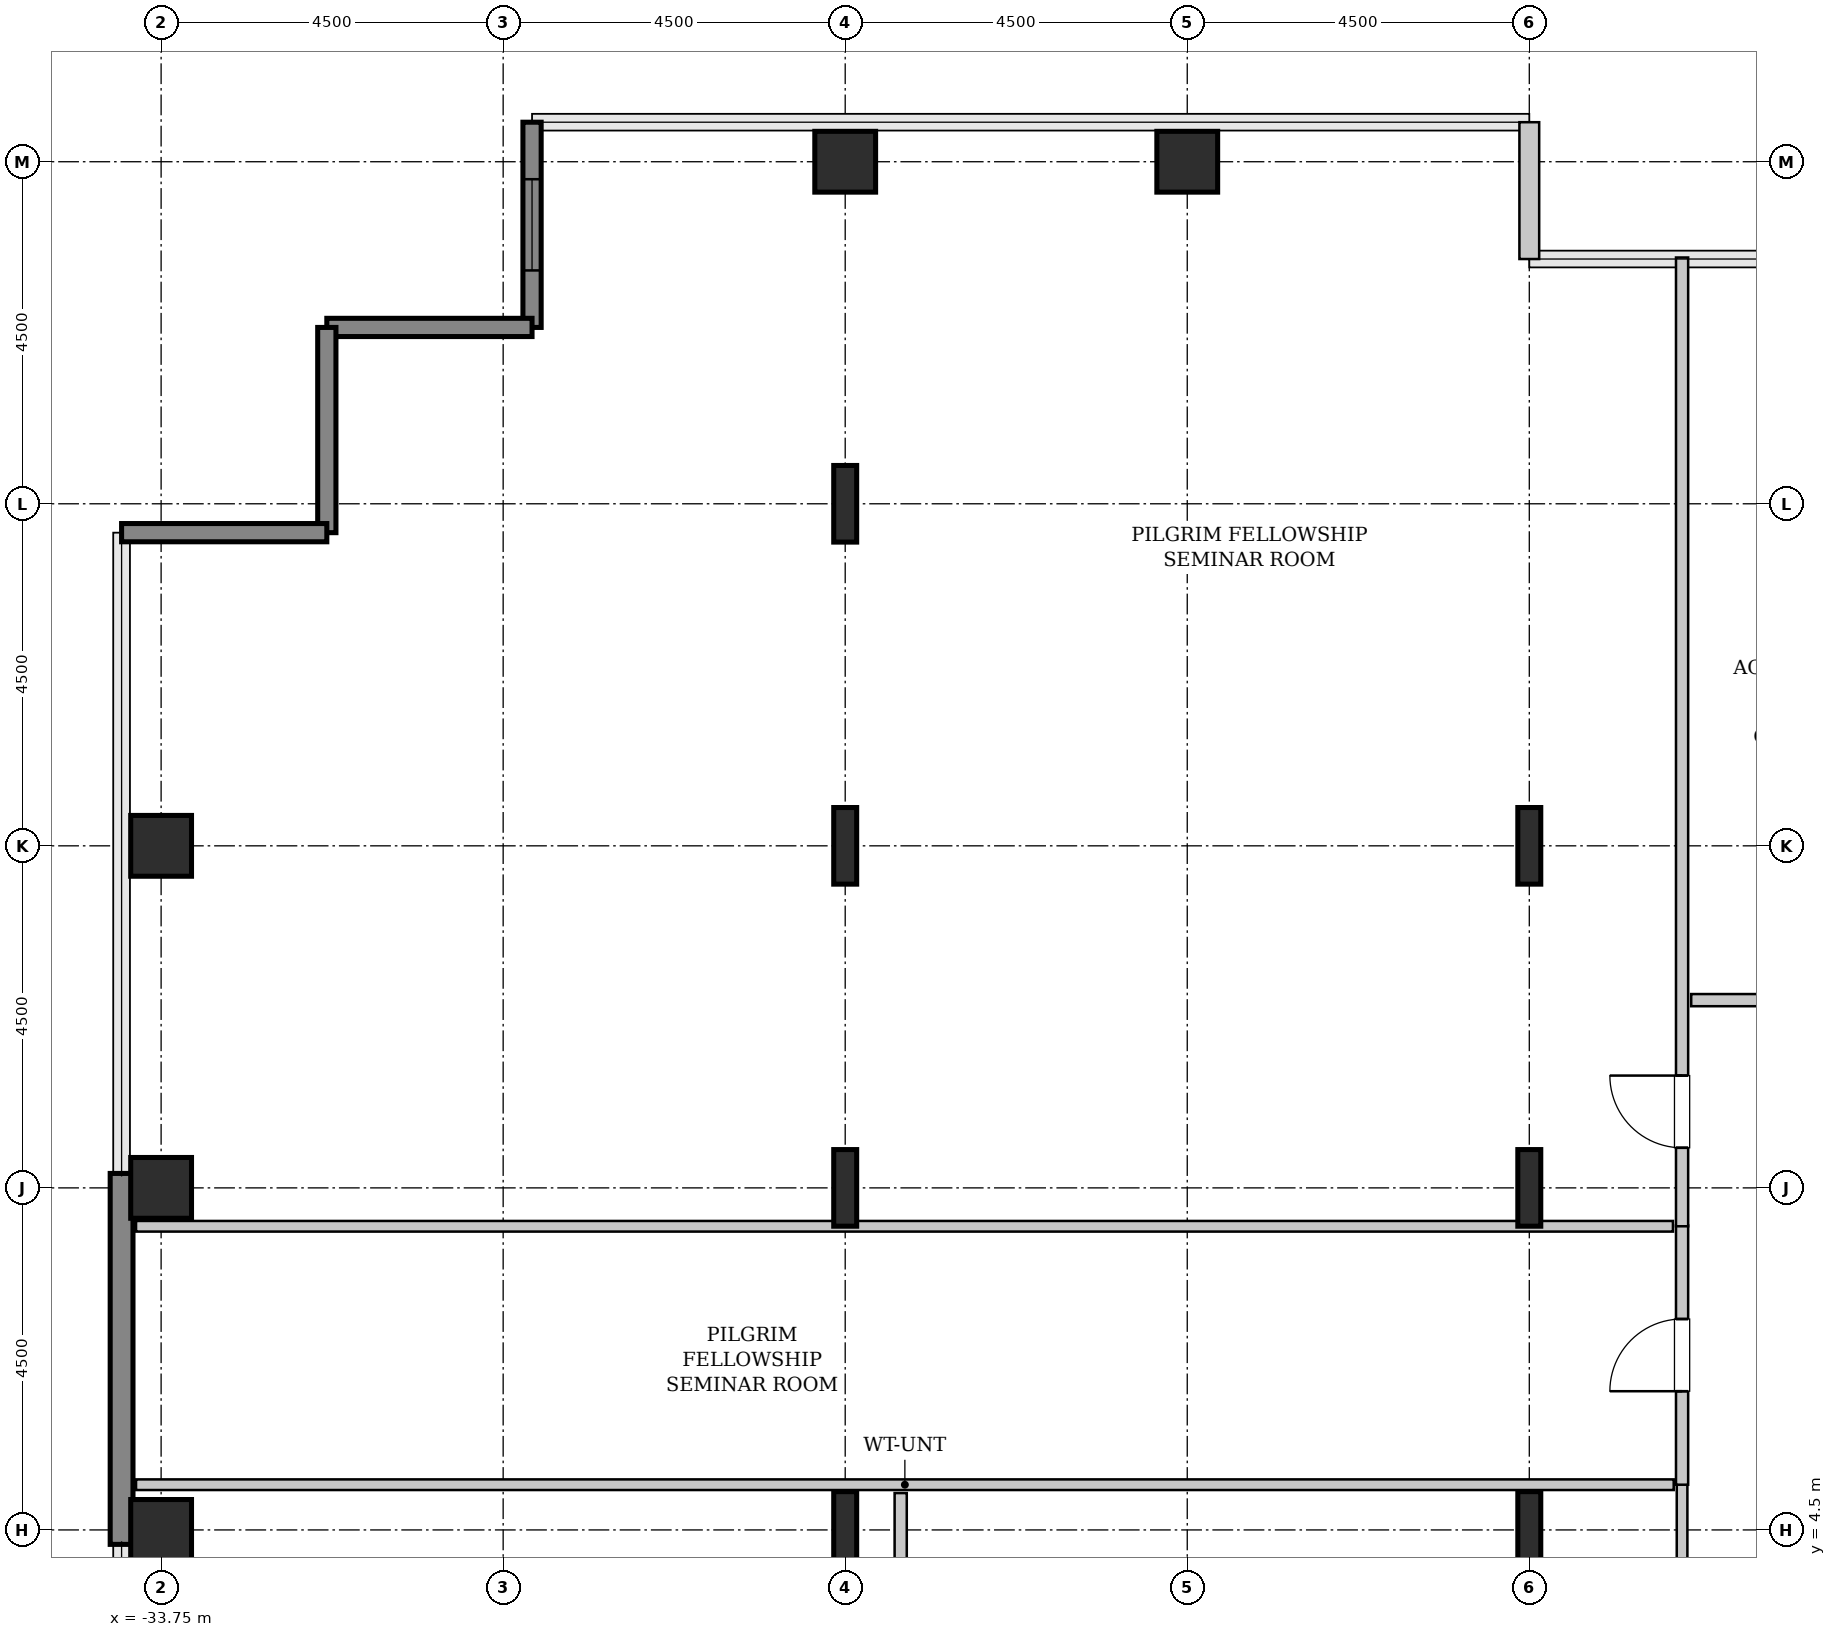
"""IFC4 building model, lengths in metres.
Left out: names, types, materials, properties, quantities, classifications, styles, units other than length and angle.
Written with IfcOpenShell. Run it as: python <this file> out.ifc"""

import sys

from ifc_helpers import new_model, si_unit, direction, frame, frame_2d, origin, origin_2d, place, context, subcontext, project, spatial, rectangle, hollow_rectangle, i_section, extrude, source, transform, mapped, element, fill, save


model = new_model("IFC4")
c1 = context("Model", 3, precision=1e-05, world=origin(), true_north=direction((0.0, 1.0)))
c2 = subcontext(c1, "Body", "Model", "MODEL_VIEW")
j1 = project(units=[si_unit("LENGTHUNIT", "METRE"), si_unit("PLANEANGLEUNIT", "RADIAN")], contexts=[c1])
p1 = place(None, origin())
s1 = spatial("IfcSite", under=j1, at=p1, CompositionType="ELEMENT")
p2 = place(p1, origin())
s2 = spatial("IfcBuilding", under=s1, at=p2, CompositionType="ELEMENT")
p3 = place(p2, frame((0.0, 0.0, 113.6)))
s3 = spatial("IfcBuildingStorey", under=s2, at=p3, CompositionType="ELEMENT", Elevation=113.6)
m1 = source(origin(), c2, "Body", "SweptSolid", [
    extrude(hollow_rectangle(XDim=0.8, YDim=0.8, WallThickness=0.04, InnerFilletRadius=0.04, OuterFilletRadius=0.08, at=origin_2d()), origin(), (0.0, 0.0, 1.0), 3.8),
])
for number, where, z_axis, x_axis in (
    (1, (-33.75, 4.5, 0.0), (0.0, 0.0, 1.0), (1.0, 0.0, 0.0)),
    (2, (-33.75, 9.0, 0.0), (0.0, 0.0, 1.0), (1.0, 0.0, 0.0)),
    (3, (-33.75, 13.5, 0.0), (0.0, 0.0, 1.0), (1.0, 0.0, 0.0)),
):
    element("IfcColumn", number, at=place(p3, frame(where, z_axis=z_axis, x_axis=x_axis)), inside=s3, PredefinedType="COLUMN", context=c2, shape_type="MappedRepresentation", body=[
        mapped(m1, transform((0.0, 0.0, 0.0), x_axis=(1.0, 0.0, 0.0), y_axis=(0.0, 1.0, 0.0), z_axis=(0.0, 0.0, 1.0), scale=1.0)),
    ])
m2 = source(origin(), c2, "Body", "SweptSolid", [
    extrude(i_section(OverallWidth=0.302, OverallDepth=1.008, WebThickness=0.021, FlangeThickness=0.04, FilletRadius=0.03, at=origin_2d()), origin(), (0.0, 0.0, 1.0), 3.8),
])
for number, where, z_axis, x_axis in (
    (4, (-24.75, 4.5, 0.0), (0.0, 0.0, 1.0), (1.0, 0.0, 0.0)),
    (5, (-24.75, 9.0, 0.0), (0.0, 0.0, 1.0), (1.0, 0.0, 0.0)),
    (6, (-24.75, 13.5, 0.0), (0.0, 0.0, 1.0), (1.0, 0.0, 0.0)),
    (7, (-24.75, 18.0, 0.0), (0.0, 0.0, 1.0), (1.0, 0.0, 0.0)),
):
    element("IfcColumn", number, at=place(p3, frame(where, z_axis=z_axis, x_axis=x_axis)), inside=s3, PredefinedType="COLUMN", context=c2, shape_type="MappedRepresentation", body=[
        mapped(m2, transform((0.0, 0.0, 0.0), x_axis=(1.0, 0.0, 0.0), y_axis=(0.0, 1.0, 0.0), z_axis=(0.0, 0.0, 1.0), scale=1.0)),
    ])
for number, where, z_axis, x_axis in (
    (8, (-24.75, 22.5, 0.0), (0.0, 0.0, 1.0), (1.0, 0.0, 0.0)),
    (9, (-20.25, 22.5, 0.0), (0.0, 0.0, 1.0), (1.0, 0.0, 0.0)),
):
    element("IfcColumn", number, at=place(p3, frame(where, z_axis=z_axis, x_axis=x_axis)), inside=s3, PredefinedType="COLUMN", context=c2, shape_type="MappedRepresentation", body=[
        mapped(m1, transform((0.0, 0.0, 0.0), x_axis=(1.0, 0.0, 0.0), y_axis=(0.0, 1.0, 0.0), z_axis=(0.0, 0.0, 1.0), scale=1.0)),
    ])
for number, where, z_axis, x_axis in (
    (10, (-15.75, 4.5, 0.0), (0.0, 0.0, 1.0), (1.0, 0.0, 0.0)),
    (11, (-15.75, 9.0, 0.0), (0.0, 0.0, 1.0), (1.0, 0.0, 0.0)),
    (12, (-15.75, 13.5, 0.0), (0.0, 0.0, 1.0), (1.0, 0.0, 0.0)),
):
    element("IfcColumn", number, at=place(p3, frame(where, z_axis=z_axis, x_axis=x_axis)), inside=s3, PredefinedType="COLUMN", context=c2, shape_type="MappedRepresentation", body=[
        mapped(m2, transform((0.0, 0.0, 0.0), x_axis=(1.0, 0.0, 0.0), y_axis=(0.0, 1.0, 0.0), z_axis=(0.0, 0.0, 1.0), scale=1.0)),
    ])
m3 = source(origin(), c2, "Body", "SweptSolid", [
    extrude(rectangle(XDim=4.88, YDim=0.3, at=frame_2d((2.44, 0.0))), origin(), (0.0, 0.0, 1.0), 3.55),
])
p4 = place(p3, frame((-34.27, 4.31, 0.0), z_axis=(0.0, 0.0, 1.0), x_axis=(0.0, 1.0, 0.0)))
e13 = element("IfcWall", 13, at=p4, inside=s3, PredefinedType="SHEAR", context=c2, shape_type="MappedRepresentation", body=[
    mapped(m3, transform((0.0, 0.0, 0.0), x_axis=(1.0, 0.0, 0.0), y_axis=(0.0, 1.0, 0.0), z_axis=(0.0, 0.0, 1.0), scale=1.0)),
])
m4 = source(origin(), c2, "Body", "SweptSolid", [
    extrude(rectangle(XDim=1.8, YDim=0.26, at=frame_2d((0.9, 0.0))), origin(), (0.0, 0.0, 1.0), 3.55),
])
p5 = place(p3, frame((-15.75, 21.22, 0.0), z_axis=(0.0, 0.0, 1.0), x_axis=(0.0, 1.0, 0.0)))
e14 = element("IfcWall", 14, at=p5, inside=s3, PredefinedType="SOLIDWALL", context=c2, shape_type="MappedRepresentation", body=[
    mapped(m4, transform((0.0, 0.0, 0.0), x_axis=(1.0, 0.0, 0.0), y_axis=(0.0, 1.0, 0.0), z_axis=(0.0, 0.0, 1.0), scale=1.0)),
])
m5 = source(origin(), c2, "Body", "SweptSolid", [
    extrude(rectangle(XDim=2.7, YDim=0.24, at=frame_2d((1.35, 0.0))), origin(), (0.0, 0.0, 1.0), 3.55),
])
p6 = place(p3, frame((-28.87, 23.02, 0.0), z_axis=(0.0, 0.0, 1.0), x_axis=(0.0, -1.0, 0.0)))
e15 = element("IfcWall", 15, at=p6, inside=s3, PredefinedType="SHEAR", context=c2, shape_type="MappedRepresentation", body=[
    mapped(m5, transform((0.0, 0.0, 0.0), x_axis=(1.0, 0.0, 0.0), y_axis=(0.0, 1.0, 0.0), z_axis=(0.0, 0.0, 1.0), scale=1.0)),
])
p7 = place(p6, frame((0.75, 0.0, 0.85)))
e16 = element("IfcOpeningElement", 16, at=p7, cuts=e15, PredefinedType="OPENING", context=c2, shape_type="SweptSolid", body=[
    extrude(rectangle(XDim=1.2, YDim=1.8, at=frame_2d((0.6, 0.9))), frame((0.0, 0.13, 0.0), z_axis=(0.0, -1.0, 0.0), x_axis=(1.0, 0.0, 0.0)), (0.0, 0.0, 1.0), 0.26),
])
for number, where, z_axis, x_axis in (
    (17, (-28.87, 20.32, 0.0), (0.0, 0.0, 1.0), (-1.0, 0.0, 0.0)),
    (18, (-31.57, 20.32, 0.0), (0.0, 0.0, 1.0), (0.0, -1.0, 0.0)),
    (19, (-31.57, 17.62, 0.0), (0.0, 0.0, 1.0), (-1.0, 0.0, 0.0)),
):
    element("IfcWall", number, at=place(p3, frame(where, z_axis=z_axis, x_axis=x_axis)), inside=s3, PredefinedType="SHEAR", context=c2, shape_type="MappedRepresentation", body=[
        mapped(m5, transform((0.0, 0.0, 0.0), x_axis=(1.0, 0.0, 0.0), y_axis=(0.0, 1.0, 0.0), z_axis=(0.0, 0.0, 1.0), scale=1.0)),
    ])
m6 = source(origin(), c2, "Body", "SweptSolid", [
    extrude(rectangle(XDim=6.365, YDim=0.14, at=frame_2d((3.183, 0.0))), origin(), (0.0, 0.0, 1.0), 3.535),
])
p8 = place(p3, frame((-13.74, -1.26, 0.0), z_axis=(0.0, 0.0, 1.0), x_axis=(0.0, 1.0, 0.0)))
e20 = element("IfcWall", 20, at=p8, inside=s3, PredefinedType="PARTITIONING", context=c2, shape_type="MappedRepresentation", body=[
    mapped(m6, transform((0.0, 0.0, 0.0), x_axis=(1.0, 0.0, 0.0), y_axis=(0.0, 1.0, 0.0), z_axis=(0.0, 0.0, 1.0), scale=1.0)),
])
m7 = source(origin(), c2, "Body", "SweptSolid", [
    extrude(rectangle(XDim=20.23, YDim=0.14, at=frame_2d((10.115, 0.0))), origin(), (0.0, 0.0, 1.0), 3.535),
])
p9 = place(p3, frame((-34.08, 5.095, 0.0), z_axis=(0.0, 0.0, 1.0), x_axis=(1.0, 0.0, 0.0)))
e21 = element("IfcWall", 21, at=p9, inside=s3, PredefinedType="PARTITIONING", context=c2, shape_type="MappedRepresentation", body=[
    mapped(m7, transform((0.0, 0.0, 0.0), x_axis=(1.0, 0.0, 0.0), y_axis=(0.0, 1.0, 0.0), z_axis=(0.0, 0.0, 1.0), scale=1.0)),
])
m8 = source(origin(), c2, "Body", "SweptSolid", [
    extrude(rectangle(XDim=10.08, YDim=0.16, at=frame_2d((5.04, 0.0))), origin(), (0.0, 0.0, 1.0), 3.535),
])
p10 = place(p3, frame((-24.02, -5.095, 0.0), z_axis=(0.0, 0.0, 1.0), x_axis=(0.0, 1.0, 0.0)))
e22 = element("IfcWall", 22, at=p10, inside=s3, PredefinedType="PARTITIONING", context=c2, shape_type="MappedRepresentation", body=[
    mapped(m8, transform((0.0, 0.0, 0.0), x_axis=(1.0, 0.0, 0.0), y_axis=(0.0, 1.0, 0.0), z_axis=(0.0, 0.0, 1.0), scale=1.0)),
])
p11 = place(p10, frame((2.37, 0.0, 0.0)))
e23 = element("IfcOpeningElement", 23, at=p11, cuts=e22, PredefinedType="OPENING", context=c2, shape_type="SweptSolid", body=[
    extrude(rectangle(XDim=0.95, YDim=2.1, at=frame_2d((0.475, 1.05))), frame((0.0, 0.09, 0.0), z_axis=(0.0, -1.0, 0.0), x_axis=(1.0, 0.0, 0.0)), (0.0, 0.0, 1.0), 0.18),
])
m9 = source(origin(), c2, "Body", "SweptSolid", [
    extrude(rectangle(XDim=3.41, YDim=0.16, at=frame_2d((1.705, 0.0))), origin(), (0.0, 0.0, 1.0), 3.535),
])
p12 = place(p3, frame((-13.74, 5.095, 0.0), z_axis=(0.0, 0.0, 1.0), x_axis=(0.0, 1.0, 0.0)))
e24 = element("IfcWall", 24, at=p12, inside=s3, PredefinedType="PARTITIONING", context=c2, shape_type="MappedRepresentation", body=[
    mapped(m9, transform((0.0, 0.0, 0.0), x_axis=(1.0, 0.0, 0.0), y_axis=(0.0, 1.0, 0.0), z_axis=(0.0, 0.0, 1.0), scale=1.0)),
])
p13 = place(p12, frame((1.23, 0.0, 0.0)))
e25 = element("IfcOpeningElement", 25, at=p13, cuts=e24, PredefinedType="OPENING", context=c2, shape_type="SweptSolid", body=[
    extrude(rectangle(XDim=0.95, YDim=2.1, at=frame_2d((0.475, 1.05))), frame((0.0, 0.09, 0.0), z_axis=(0.0, -1.0, 0.0), x_axis=(1.0, 0.0, 0.0)), (0.0, 0.0, 1.0), 0.18),
])
m10 = source(origin(), c2, "Body", "SweptSolid", [
    extrude(rectangle(XDim=20.22, YDim=0.14, at=frame_2d((10.11, 0.0))), origin(), (0.0, 0.0, 1.0), 2.875),
])
p14 = place(p3, frame((-34.08, 8.495, 0.0), z_axis=(0.0, 0.0, 1.0), x_axis=(1.0, 0.0, 0.0)))
e26 = element("IfcWall", 26, at=p14, inside=s3, PredefinedType="PARTITIONING", context=c2, shape_type="MappedRepresentation", body=[
    mapped(m10, transform((0.0, 0.0, 0.0), x_axis=(1.0, 0.0, 0.0), y_axis=(0.0, 1.0, 0.0), z_axis=(0.0, 0.0, 1.0), scale=1.0)),
])
m11 = source(origin(), c2, "Body", "SweptSolid", [
    extrude(rectangle(XDim=12.745, YDim=0.16, at=frame_2d((6.373, 0.0))), origin(), (0.0, 0.0, 1.0), 3.535),
])
p15 = place(p3, frame((-13.74, 8.495, 0.0), z_axis=(0.0, 0.0, 1.0), x_axis=(0.0, 1.0, 0.0)))
e27 = element("IfcWall", 27, at=p15, inside=s3, PredefinedType="PARTITIONING", context=c2, shape_type="MappedRepresentation", body=[
    mapped(m11, transform((0.0, 0.0, 0.0), x_axis=(1.0, 0.0, 0.0), y_axis=(0.0, 1.0, 0.0), z_axis=(0.0, 0.0, 1.0), scale=1.0)),
])
p16 = place(p15, frame((1.032, 0.0, 0.0)))
e28 = element("IfcOpeningElement", 28, at=p16, cuts=e27, PredefinedType="OPENING", context=c2, shape_type="SweptSolid", body=[
    extrude(rectangle(XDim=0.95, YDim=2.1, at=frame_2d((0.475, 1.05))), frame((0.0, 0.09, 0.0), z_axis=(0.0, -1.0, 0.0), x_axis=(1.0, 0.0, 0.0)), (0.0, 0.0, 1.0), 0.18),
])
m12 = source(origin(), c2, "Body", "SweptSolid", [
    extrude(rectangle(XDim=4.125, YDim=0.16, at=frame_2d((2.062, 0.0))), origin(), (0.0, 0.0, 1.0), 3.535),
])
p17 = place(p3, frame((-13.62, 11.47, 0.0), z_axis=(0.0, 0.0, 1.0), x_axis=(1.0, 0.0, 0.0)))
e29 = element("IfcWall", 29, at=p17, inside=s3, PredefinedType="PARTITIONING", context=c2, shape_type="MappedRepresentation", body=[
    mapped(m12, transform((0.0, 0.0, 0.0), x_axis=(1.0, 0.0, 0.0), y_axis=(0.0, 1.0, 0.0), z_axis=(0.0, 0.0, 1.0), scale=1.0)),
])
p18 = place(p17, frame((1.587, 0.0, 0.0)))
e30 = element("IfcOpeningElement", 30, at=p18, cuts=e29, PredefinedType="OPENING", context=c2, shape_type="SweptSolid", body=[
    extrude(rectangle(XDim=0.95, YDim=2.1, at=frame_2d((0.475, 1.05))), frame((0.0, 0.09, 0.0), z_axis=(0.0, -1.0, 0.0), x_axis=(1.0, 0.0, 0.0)), (0.0, 0.0, 1.0), 0.18),
])
m13 = source(origin(), c2, "Body", "SweptSolid", [
    extrude(rectangle(XDim=1.2, YDim=1.8, at=frame_2d((0.6, 0.9))), frame((0.0, 0.03, 0.0), z_axis=(0.0, -1.0, 0.0), x_axis=(1.0, 0.0, 0.0)), (0.0, 0.0, 1.0), 0.06),
])
p19 = place(p7, origin())
e31 = element("IfcWindow", 31, at=p19, inside=s3, PartitioningType="SINGLE_PANEL", PredefinedType="WINDOW", context=c2, shape_type="MappedRepresentation", body=[
    mapped(m13, transform((0.0, 0.0, 0.0), x_axis=(1.0, 0.0, 0.0), y_axis=(0.0, 1.0, 0.0), z_axis=(0.0, 0.0, 1.0), scale=1.0)),
])
fill(e16, e31)
m14 = source(origin(), c2, "Body", "SweptSolid", [
    extrude(rectangle(XDim=0.95, YDim=2.1, at=frame_2d((0.475, 1.05))), frame((0.0, 0.025, 0.0), z_axis=(0.0, -1.0, 0.0), x_axis=(1.0, 0.0, 0.0)), (0.0, 0.0, 1.0), 0.05),
])
p20 = place(p13, origin())
e32 = element("IfcDoor", 32, at=p20, inside=s3, OperationType="SINGLE_SWING_LEFT", PredefinedType="DOOR", context=c2, shape_type="MappedRepresentation", body=[
    mapped(m14, transform((0.0, 0.0, 0.0), x_axis=(1.0, 0.0, 0.0), y_axis=(0.0, 1.0, 0.0), z_axis=(0.0, 0.0, 1.0), scale=1.0)),
])
fill(e25, e32)
p21 = place(p16, origin())
e33 = element("IfcDoor", 33, at=p21, inside=s3, OperationType="SINGLE_SWING_RIGHT", PredefinedType="DOOR", context=c2, shape_type="MappedRepresentation", body=[
    mapped(m14, transform((0.0, 0.0, 0.0), x_axis=(1.0, 0.0, 0.0), y_axis=(0.0, 1.0, 0.0), z_axis=(0.0, 0.0, 1.0), scale=1.0)),
])
fill(e28, e33)
save(model, sys.argv[1])
